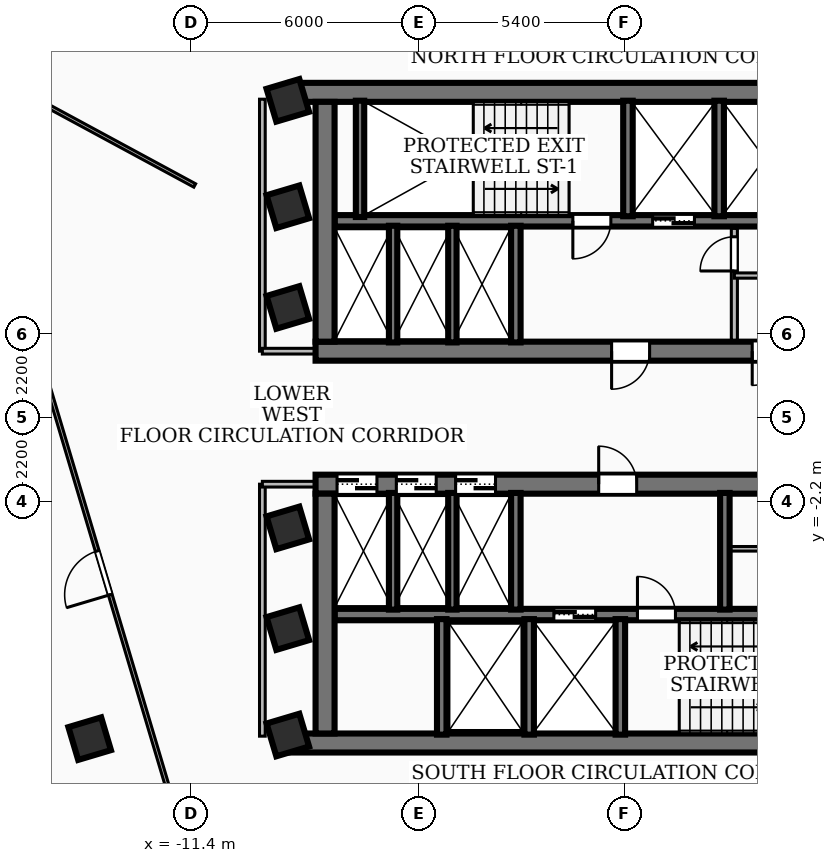
"""IFC4 building model, lengths in metres.
Left out: names, types, materials, properties, quantities, classifications, styles, units other than length and angle.
Written with IfcOpenShell. Run it as: python <this file> out.ifc"""

import sys

from ifc_helpers import new_model, si_unit, direction, frame, frame_2d, origin, origin_2d, place, context, subcontext, project, spatial, rectangle, extrude, element, fill, save


model = new_model("IFC4")
c1 = context("Model", 3, precision=1e-05, world=origin(), true_north=direction((0.0, 1.0)))
c2 = subcontext(c1, "Body", "Model", "MODEL_VIEW")
j1 = project(units=[si_unit("LENGTHUNIT", "METRE"), si_unit("PLANEANGLEUNIT", "RADIAN")], contexts=[c1])
p1 = place(None, origin())
s1 = spatial("IfcSite", under=j1, at=p1, CompositionType="ELEMENT")
p2 = place(p1, origin())
s2 = spatial("IfcBuilding", under=s1, at=p2, CompositionType="ELEMENT")
p3 = place(p2, frame((0.0, 0.0, 141.48)))
s3 = spatial("IfcBuildingStorey", under=s2, at=p3, CompositionType="ELEMENT", Elevation=141.48)
p4 = place(p3, frame((-8.78, 8.56, 0.0), z_axis=(0.0, 0.0, 1.0), x_axis=(1.0, 0.0, 0.0)))
e1 = element("IfcWall", 1, at=p4, inside=s3, PredefinedType="SHEAR", context=c2, shape_type="SweptSolid", body=[
    extrude(rectangle(XDim=17.56, YDim=0.5, at=frame_2d((8.78, 0.0))), origin(), (0.0, 0.0, 1.0), 3.32),
])
p5 = place(p3, frame((8.12, 1.75, 0.0), z_axis=(0.0, 0.0, 1.0), x_axis=(-1.0, 0.0, 0.0)))
e2 = element("IfcWall", 2, at=p5, inside=s3, PredefinedType="SHEAR", context=c2, shape_type="SweptSolid", body=[
    extrude(rectangle(XDim=16.24, YDim=0.5, at=frame_2d((8.12, 0.0))), origin(), (0.0, 0.0, 1.0), 3.32),
])
p6 = place(p5, frame((7.45, 0.0, 0.0)))
e3 = element("IfcOpeningElement", 3, at=p6, cuts=e2, PredefinedType="OPENING", context=c2, shape_type="SweptSolid", body=[
    extrude(rectangle(XDim=1.0, YDim=2.1, at=frame_2d((0.5, 1.05))), frame((0.0, 0.26, 0.0), z_axis=(0.0, -1.0, 0.0), x_axis=(1.0, 0.0, 0.0)), (0.0, 0.0, 1.0), 0.52),
])
p7 = place(p5, frame((3.85, 0.0, 0.0)))
e4 = element("IfcOpeningElement", 4, at=p7, cuts=e2, PredefinedType="OPENING", context=c2, shape_type="SweptSolid", body=[
    extrude(rectangle(XDim=0.9, YDim=2.06, at=frame_2d((0.45, 1.03))), frame((0.0, 0.26, 0.0), z_axis=(0.0, -1.0, 0.0), x_axis=(1.0, 0.0, 0.0)), (0.0, 0.0, 1.0), 0.52),
])
p8 = place(p5, frame((2.35, 0.0, 0.0)))
e5 = element("IfcOpeningElement", 5, at=p8, cuts=e2, PredefinedType="OPENING", context=c2, shape_type="SweptSolid", body=[
    extrude(rectangle(XDim=0.9, YDim=2.06, at=frame_2d((0.45, 1.03))), frame((0.0, 0.26, 0.0), z_axis=(0.0, -1.0, 0.0), x_axis=(1.0, 0.0, 0.0)), (0.0, 0.0, 1.0), 0.52),
])
p9 = place(p5, frame((0.8, 0.0, 0.0)))
e6 = element("IfcOpeningElement", 6, at=p9, cuts=e2, PredefinedType="OPENING", context=c2, shape_type="SweptSolid", body=[
    extrude(rectangle(XDim=0.9, YDim=2.06, at=frame_2d((0.45, 1.03))), frame((0.0, 0.26, 0.0), z_axis=(0.0, -1.0, 0.0), x_axis=(1.0, 0.0, 0.0)), (0.0, 0.0, 1.0), 0.52),
])
p10 = place(p3, frame((-7.87, 2.0, 0.0), z_axis=(0.0, 0.0, 1.0), x_axis=(0.0, 1.0, 0.0)))
e7 = element("IfcWall", 7, at=p10, inside=s3, PredefinedType="SHEAR", context=c2, shape_type="SweptSolid", body=[
    extrude(rectangle(XDim=6.31, YDim=0.5, at=frame_2d((3.155, 0.0))), origin(), (0.0, 0.0, 1.0), 3.32),
])
p11 = place(p3, frame((7.62, 5.18, 0.0), z_axis=(0.0, 0.0, 1.0), x_axis=(-1.0, 0.0, 0.0)))
e8 = element("IfcWall", 8, at=p11, inside=s3, PredefinedType="SOLIDWALL", context=c2, shape_type="SweptSolid", body=[
    extrude(rectangle(XDim=15.24, YDim=0.3, at=frame_2d((7.62, 0.0))), origin(), (0.0, 0.0, 1.0), 3.32),
])
p12 = place(p11, frame((5.77, 0.0, 0.0)))
e9 = element("IfcOpeningElement", 9, at=p12, cuts=e8, PredefinedType="OPENING", context=c2, shape_type="SweptSolid", body=[
    extrude(rectangle(XDim=1.1, YDim=2.15, at=frame_2d((0.55, 1.075))), frame((0.0, 0.16, 0.0), z_axis=(0.0, -1.0, 0.0), x_axis=(1.0, 0.0, 0.0)), (0.0, 0.0, 1.0), 0.32),
])
p13 = place(p11, frame((2.97, 0.0, 0.0)))
e10 = element("IfcOpeningElement", 10, at=p13, cuts=e8, PredefinedType="OPENING", context=c2, shape_type="SweptSolid", body=[
    extrude(rectangle(XDim=1.1, YDim=2.15, at=frame_2d((0.55, 1.075))), frame((0.0, 0.16, 0.0), z_axis=(0.0, -1.0, 0.0), x_axis=(1.0, 0.0, 0.0)), (0.0, 0.0, 1.0), 0.32),
])
p14 = place(p11, frame((7.97, 0.0, 0.0)))
e11 = element("IfcOpeningElement", 11, at=p14, cuts=e8, PredefinedType="OPENING", context=c2, shape_type="SweptSolid", body=[
    extrude(rectangle(XDim=1.0, YDim=2.1, at=frame_2d((0.5, 1.05))), frame((0.0, 0.16, 0.0), z_axis=(0.0, -1.0, 0.0), x_axis=(1.0, 0.0, 0.0)), (0.0, 0.0, 1.0), 0.32),
])
p15 = place(p3, frame((8.78, -8.56, 0.0), z_axis=(0.0, 0.0, 1.0), x_axis=(-1.0, 0.0, 0.0)))
e12 = element("IfcWall", 12, at=p15, inside=s3, PredefinedType="SHEAR", context=c2, shape_type="SweptSolid", body=[
    extrude(rectangle(XDim=17.56, YDim=0.5, at=frame_2d((8.78, 0.0))), origin(), (0.0, 0.0, 1.0), 3.32),
])
p16 = place(p3, frame((-8.12, -1.75, 0.0), z_axis=(0.0, 0.0, 1.0), x_axis=(1.0, 0.0, 0.0)))
e13 = element("IfcWall", 13, at=p16, inside=s3, PredefinedType="SHEAR", context=c2, shape_type="SweptSolid", body=[
    extrude(rectangle(XDim=16.24, YDim=0.5, at=frame_2d((8.12, 0.0))), origin(), (0.0, 0.0, 1.0), 3.32),
])
p17 = place(p16, frame((7.45, 0.0, 0.0)))
e14 = element("IfcOpeningElement", 14, at=p17, cuts=e13, PredefinedType="OPENING", context=c2, shape_type="SweptSolid", body=[
    extrude(rectangle(XDim=1.0, YDim=2.1, at=frame_2d((0.5, 1.05))), frame((0.0, 0.26, 0.0), z_axis=(0.0, -1.0, 0.0), x_axis=(1.0, 0.0, 0.0)), (0.0, 0.0, 1.0), 0.52),
])
p18 = place(p16, frame((12.65, 0.0, 0.0)))
e15 = element("IfcOpeningElement", 15, at=p18, cuts=e13, PredefinedType="OPENING", context=c2, shape_type="SweptSolid", body=[
    extrude(rectangle(XDim=0.9, YDim=2.06, at=frame_2d((0.45, 1.03))), frame((0.0, 0.26, 0.0), z_axis=(0.0, -1.0, 0.0), x_axis=(1.0, 0.0, 0.0)), (0.0, 0.0, 1.0), 0.52),
])
p19 = place(p16, frame((0.565, 0.0, 0.0)))
e16 = element("IfcOpeningElement", 16, at=p19, cuts=e13, PredefinedType="OPENING", context=c2, shape_type="SweptSolid", body=[
    extrude(rectangle(XDim=1.05, YDim=2.15, at=frame_2d((0.525, 1.075))), frame((0.0, 0.26, 0.0), z_axis=(0.0, -1.0, 0.0), x_axis=(1.0, 0.0, 0.0)), (0.0, 0.0, 1.0), 0.52),
])
p20 = place(p16, frame((2.125, 0.0, 0.0)))
e17 = element("IfcOpeningElement", 17, at=p20, cuts=e13, PredefinedType="OPENING", context=c2, shape_type="SweptSolid", body=[
    extrude(rectangle(XDim=1.05, YDim=2.15, at=frame_2d((0.525, 1.075))), frame((0.0, 0.26, 0.0), z_axis=(0.0, -1.0, 0.0), x_axis=(1.0, 0.0, 0.0)), (0.0, 0.0, 1.0), 0.52),
])
p21 = place(p16, frame((3.685, 0.0, 0.0)))
e18 = element("IfcOpeningElement", 18, at=p21, cuts=e13, PredefinedType="OPENING", context=c2, shape_type="SweptSolid", body=[
    extrude(rectangle(XDim=1.05, YDim=2.15, at=frame_2d((0.525, 1.075))), frame((0.0, 0.26, 0.0), z_axis=(0.0, -1.0, 0.0), x_axis=(1.0, 0.0, 0.0)), (0.0, 0.0, 1.0), 0.52),
])
p22 = place(p3, frame((-7.87, -8.31, 0.0), z_axis=(0.0, 0.0, 1.0), x_axis=(0.0, 1.0, 0.0)))
e19 = element("IfcWall", 19, at=p22, inside=s3, PredefinedType="SHEAR", context=c2, shape_type="SweptSolid", body=[
    extrude(rectangle(XDim=6.31, YDim=0.5, at=frame_2d((3.155, 0.0))), origin(), (0.0, 0.0, 1.0), 3.32),
])
p23 = place(p3, frame((-7.62, -5.18, 0.0), z_axis=(0.0, 0.0, 1.0), x_axis=(1.0, 0.0, 0.0)))
e20 = element("IfcWall", 20, at=p23, inside=s3, PredefinedType="SOLIDWALL", context=c2, shape_type="SweptSolid", body=[
    extrude(rectangle(XDim=15.24, YDim=0.3, at=frame_2d((7.62, 0.0))), origin(), (0.0, 0.0, 1.0), 3.32),
])
p24 = place(p23, frame((5.77, 0.0, 0.0)))
e21 = element("IfcOpeningElement", 21, at=p24, cuts=e20, PredefinedType="OPENING", context=c2, shape_type="SweptSolid", body=[
    extrude(rectangle(XDim=1.1, YDim=2.15, at=frame_2d((0.55, 1.075))), frame((0.0, 0.16, 0.0), z_axis=(0.0, -1.0, 0.0), x_axis=(1.0, 0.0, 0.0)), (0.0, 0.0, 1.0), 0.32),
])
p25 = place(p23, frame((7.97, 0.0, 0.0)))
e22 = element("IfcOpeningElement", 22, at=p25, cuts=e20, PredefinedType="OPENING", context=c2, shape_type="SweptSolid", body=[
    extrude(rectangle(XDim=1.0, YDim=2.1, at=frame_2d((0.5, 1.05))), frame((0.0, 0.16, 0.0), z_axis=(0.0, -1.0, 0.0), x_axis=(1.0, 0.0, 0.0)), (0.0, 0.0, 1.0), 0.32),
])
p26 = place(p3, frame((-6.95, 5.28, 0.0), z_axis=(0.0, 0.0, 1.0), x_axis=(0.0, 1.0, 0.0)))
e23 = element("IfcWall", 23, at=p26, inside=s3, PredefinedType="SOLIDWALL", context=c2, shape_type="SweptSolid", body=[
    extrude(rectangle(XDim=3.06, YDim=0.22, at=frame_2d((1.53, 0.0))), origin(), (0.0, 0.0, 1.0), 3.32),
])
for number, where, z_axis, x_axis in (
    (24, (0.1, 5.3, 0.0), (0.0, 0.0, 1.0), (0.0, 1.0, 0.0)),
    (25, (2.5, 5.3, 0.0), (0.0, 0.0, 1.0), (0.0, 1.0, 0.0)),
):
    element("IfcWall", number, at=place(p3, frame(where, z_axis=z_axis, x_axis=x_axis)), inside=s3, PredefinedType="SOLIDWALL", context=c2, shape_type="SweptSolid", body=[
        extrude(rectangle(XDim=3.04, YDim=0.25, at=frame_2d((1.52, 0.0))), origin(), (0.0, 0.0, 1.0), 3.32),
    ])
p27 = place(p3, frame((-2.85, 1.98, 0.0), z_axis=(0.0, 0.0, 1.0), x_axis=(0.0, 1.0, 0.0)))
e26 = element("IfcWall", 26, at=p27, inside=s3, PredefinedType="SOLIDWALL", context=c2, shape_type="SweptSolid", body=[
    extrude(rectangle(XDim=3.07, YDim=0.25, at=frame_2d((1.535, 0.0))), origin(), (0.0, 0.0, 1.0), 3.32),
])
for number, where, z_axis, x_axis in (
    (27, (-0.1, -8.34, 0.0), (0.0, 0.0, 1.0), (0.0, 1.0, 0.0)),
    (28, (-2.5, -8.34, 0.0), (0.0, 0.0, 1.0), (0.0, 1.0, 0.0)),
    (29, (-4.8, -8.34, 0.0), (0.0, 0.0, 1.0), (0.0, 1.0, 0.0)),
):
    element("IfcWall", number, at=place(p3, frame(where, z_axis=z_axis, x_axis=x_axis)), inside=s3, PredefinedType="SOLIDWALL", context=c2, shape_type="SweptSolid", body=[
        extrude(rectangle(XDim=3.04, YDim=0.25, at=frame_2d((1.52, 0.0))), origin(), (0.0, 0.0, 1.0), 3.32),
    ])
for number, where, z_axis, x_axis in (
    (30, (-2.85, -5.05, 0.0), (0.0, 0.0, 1.0), (0.0, 1.0, 0.0)),
    (31, (2.65, -5.05, 0.0), (0.0, 0.0, 1.0), (0.0, 1.0, 0.0)),
):
    element("IfcWall", number, at=place(p3, frame(where, z_axis=z_axis, x_axis=x_axis)), inside=s3, PredefinedType="SOLIDWALL", context=c2, shape_type="SweptSolid", body=[
        extrude(rectangle(XDim=3.07, YDim=0.25, at=frame_2d((1.535, 0.0))), origin(), (0.0, 0.0, 1.0), 3.32),
    ])
for number, where, z_axis, x_axis in (
    (32, (-6.08, 1.98, 0.0), (0.0, 0.0, 1.0), (0.0, 1.0, 0.0)),
    (33, (-4.52, 1.98, 0.0), (0.0, 0.0, 1.0), (0.0, 1.0, 0.0)),
    (34, (-6.08, -5.05, 0.0), (0.0, 0.0, 1.0), (0.0, 1.0, 0.0)),
    (35, (-4.52, -5.05, 0.0), (0.0, 0.0, 1.0), (0.0, 1.0, 0.0)),
):
    element("IfcWall", number, at=place(p3, frame(where, z_axis=z_axis, x_axis=x_axis)), inside=s3, PredefinedType="SOLIDWALL", context=c2, shape_type="SweptSolid", body=[
        extrude(rectangle(XDim=3.07, YDim=0.22, at=frame_2d((1.535, 0.0))), origin(), (0.0, 0.0, 1.0), 3.32),
    ])
for number, where, z_axis, x_axis in (
    (36, (-8.85, -5.55, 0.0), (0.0, 0.0, 1.0), (0.958, 0.286, 0.0)),
    (37, (-8.85, -2.9, 0.0), (0.0, 0.0, 1.0), (0.958, 0.286, 0.0)),
    (38, (-8.85, 2.9, 0.0), (0.0, 0.0, 1.0), (0.958, 0.286, 0.0)),
    (39, (-8.85, 5.55, 0.0), (0.0, 0.0, 1.0), (0.958, 0.286, 0.0)),
    (40, (-8.85, 8.35, 0.0), (0.0, 0.0, 1.0), (0.958, 0.286, 0.0)),
    (41, (-8.85, -8.35, 0.0), (0.0, 0.0, 1.0), (0.958, 0.286, 0.0)),
    (42, (-14.064, -8.445, 0.0), (0.0, 0.0, 1.0), (0.958, 0.286, 0.0)),
):
    element("IfcColumn", number, at=place(p3, frame(where, z_axis=z_axis, x_axis=x_axis)), inside=s3, PredefinedType="COLUMN", context=c2, shape_type="SweptSolid", body=[
        extrude(rectangle(XDim=0.9, YDim=0.9, at=origin_2d()), origin(), (0.0, 0.0, 1.0), 3.6),
    ])
p28 = place(p3, frame((2.9, 2.04, 0.0), z_axis=(0.0, 0.0, 1.0), x_axis=(0.0, 1.0, 0.0)))
e43 = element("IfcWall", 43, at=p28, inside=s3, PredefinedType="PARTITIONING", context=c2, shape_type="SweptSolid", body=[
    extrude(rectangle(XDim=2.94, YDim=0.16, at=frame_2d((1.47, 0.0))), origin(), (0.0, 0.0, 1.0), 2.55),
])
p29 = place(p28, frame((1.82, 0.0, 0.0)))
e44 = element("IfcOpeningElement", 44, at=p29, cuts=e43, PredefinedType="OPENING", context=c2, shape_type="SweptSolid", body=[
    extrude(rectangle(XDim=0.9, YDim=2.06, at=frame_2d((0.45, 1.03))), frame((0.0, 0.09, 0.0), z_axis=(0.0, -1.0, 0.0), x_axis=(1.0, 0.0, 0.0)), (0.0, 0.0, 1.0), 0.18),
])
p30 = place(p3, frame((2.9, 3.74, 0.0), z_axis=(0.0, 0.0, 1.0), x_axis=(1.0, 0.0, 0.0)))
e45 = element("IfcWall", 45, at=p30, inside=s3, PredefinedType="PARTITIONING", context=c2, shape_type="SweptSolid", body=[
    extrude(rectangle(XDim=4.65, YDim=0.138, at=frame_2d((2.325, 0.0))), origin(), (0.0, 0.0, 1.0), 3.32),
])
p31 = place(p3, frame((2.8, -3.45, 0.0), z_axis=(0.0, 0.0, 1.0), x_axis=(1.0, 0.0, 0.0)))
e46 = element("IfcWall", 46, at=p31, inside=s3, PredefinedType="PARTITIONING", context=c2, shape_type="SweptSolid", body=[
    extrude(rectangle(XDim=4.68, YDim=0.12, at=frame_2d((2.34, 0.0))), origin(), (0.0, 0.0, 1.0), 3.32),
])
p32 = place(p31, frame((1.9, 0.0, 0.0)))
e47 = element("IfcOpeningElement", 47, at=p32, cuts=e46, PredefinedType="OPENING", context=c2, shape_type="SweptSolid", body=[
    extrude(rectangle(XDim=0.86, YDim=2.04, at=frame_2d((0.43, 1.02))), frame((0.0, 0.07, 0.0), z_axis=(0.0, -1.0, 0.0), x_axis=(1.0, 0.0, 0.0)), (0.0, 0.0, 1.0), 0.14),
])
p33 = place(p3, frame((-9.52, 1.75, 0.0), z_axis=(0.0, 0.0, 1.0), x_axis=(0.0, 1.0, 0.0)))
e48 = element("IfcWall", 48, at=p33, inside=s3, PredefinedType="PARTITIONING", context=c2, shape_type="SweptSolid", body=[
    extrude(rectangle(XDim=6.63, YDim=0.15, at=frame_2d((3.315, 0.0))), origin(), (0.0, 0.0, 1.0), 2.55),
])
p34 = place(p3, frame((-7.85, 1.75, 0.0), z_axis=(0.0, 0.0, 1.0), x_axis=(-1.0, 0.0, 0.0)))
e49 = element("IfcWall", 49, at=p34, inside=s3, PredefinedType="PARTITIONING", context=c2, shape_type="SweptSolid", body=[
    extrude(rectangle(XDim=1.67, YDim=0.15, at=frame_2d((0.835, 0.0))), origin(), (0.0, 0.0, 1.0), 2.55),
])
p35 = place(p3, frame((-9.52, -8.38, 0.0), z_axis=(0.0, 0.0, 1.0), x_axis=(0.0, 1.0, 0.0)))
e50 = element("IfcWall", 50, at=p35, inside=s3, PredefinedType="PARTITIONING", context=c2, shape_type="SweptSolid", body=[
    extrude(rectangle(XDim=6.63, YDim=0.15, at=frame_2d((3.315, 0.0))), origin(), (0.0, 0.0, 1.0), 2.55),
])
p36 = place(p3, frame((-7.85, -1.75, 0.0), z_axis=(0.0, 0.0, 1.0), x_axis=(-1.0, 0.0, 0.0)))
e51 = element("IfcWall", 51, at=p36, inside=s3, PredefinedType="PARTITIONING", context=c2, shape_type="SweptSolid", body=[
    extrude(rectangle(XDim=1.67, YDim=0.15, at=frame_2d((0.835, 0.0))), origin(), (0.0, 0.0, 1.0), 2.55),
])
p37 = place(p3, frame((-11.3, 6.11, 0.0), z_axis=(0.0, 0.0, 1.0), x_axis=(-0.879653556483, 0.475614991948, 0.0)))
e52 = element("IfcWall", 52, at=p37, inside=s3, PredefinedType="PARTITIONING", context=c2, shape_type="SweptSolid", body=[
    extrude(rectangle(XDim=6.829, YDim=0.1, at=frame_2d((3.414, 0.0))), origin(), (0.0, 0.0, 1.0), 3.32),
])
p38 = place(p3, frame((-10.655, -14.279, 0.0), z_axis=(0.0, 0.0, 1.0), x_axis=(-0.285665949025, 0.958329257389, 0.0)))
e53 = element("IfcWall", 53, at=p38, inside=s3, PredefinedType="PARTITIONING", context=c2, shape_type="SweptSolid", body=[
    extrude(rectangle(XDim=20.66, YDim=0.1, at=frame_2d((10.33, 0.0))), origin(), (0.0, 0.0, 1.0), 2.55),
])
p39 = place(p38, frame((10.04, 0.0, 0.0)))
e54 = element("IfcOpeningElement", 54, at=p39, cuts=e53, PredefinedType="OPENING", context=c2, shape_type="SweptSolid", body=[
    extrude(rectangle(XDim=1.2, YDim=2.1, at=frame_2d((0.6, 1.05))), frame((0.0, 0.06, 0.0), z_axis=(0.0, -1.0, 0.0), x_axis=(1.0, 0.0, 0.0)), (0.0, 0.0, 1.0), 0.12),
])
p40 = place(p6, origin())
e55 = element("IfcDoor", 55, at=p40, inside=s3, OperationType="SINGLE_SWING_RIGHT", PredefinedType="DOOR", context=c2, shape_type="SweptSolid", body=[
    extrude(rectangle(XDim=1.0, YDim=2.1, at=frame_2d((0.5, 1.05))), frame((0.0, 0.025, 0.0), z_axis=(0.0, -1.0, 0.0), x_axis=(1.0, 0.0, 0.0)), (0.0, 0.0, 1.0), 0.05),
])
fill(e3, e55)
p41 = place(p17, origin())
e56 = element("IfcDoor", 56, at=p41, inside=s3, OperationType="SINGLE_SWING_LEFT", PredefinedType="DOOR", context=c2, shape_type="SweptSolid", body=[
    extrude(rectangle(XDim=1.0, YDim=2.1, at=frame_2d((0.5, 1.05))), frame((0.0, 0.025, 0.0), z_axis=(0.0, -1.0, 0.0), x_axis=(1.0, 0.0, 0.0)), (0.0, 0.0, 1.0), 0.05),
])
fill(e14, e56)
p42 = place(p12, origin())
e57 = element("IfcDoor", 57, at=p42, inside=s3, OperationType="DOUBLE_DOOR_SLIDING", PredefinedType="DOOR", context=c2, shape_type="SweptSolid", body=[
    extrude(rectangle(XDim=1.1, YDim=2.15, at=frame_2d((0.55, 1.075))), frame((0.0, 0.025, 0.0), z_axis=(0.0, -1.0, 0.0), x_axis=(1.0, 0.0, 0.0)), (0.0, 0.0, 1.0), 0.05),
])
fill(e9, e57)
p43 = place(p14, origin())
e58 = element("IfcDoor", 58, at=p43, inside=s3, OperationType="SINGLE_SWING_RIGHT", PredefinedType="DOOR", context=c2, shape_type="SweptSolid", body=[
    extrude(rectangle(XDim=1.0, YDim=2.1, at=frame_2d((0.5, 1.05))), frame((0.0, 0.025, 0.0), z_axis=(0.0, -1.0, 0.0), x_axis=(1.0, 0.0, 0.0)), (0.0, 0.0, 1.0), 0.05),
])
fill(e11, e58)
p44 = place(p24, origin())
e59 = element("IfcDoor", 59, at=p44, inside=s3, OperationType="DOUBLE_DOOR_SLIDING", PredefinedType="DOOR", context=c2, shape_type="SweptSolid", body=[
    extrude(rectangle(XDim=1.1, YDim=2.15, at=frame_2d((0.55, 1.075))), frame((0.0, 0.025, 0.0), z_axis=(0.0, -1.0, 0.0), x_axis=(1.0, 0.0, 0.0)), (0.0, 0.0, 1.0), 0.05),
])
fill(e21, e59)
p45 = place(p25, origin())
e60 = element("IfcDoor", 60, at=p45, inside=s3, OperationType="SINGLE_SWING_LEFT", PredefinedType="DOOR", context=c2, shape_type="SweptSolid", body=[
    extrude(rectangle(XDim=1.0, YDim=2.1, at=frame_2d((0.5, 1.05))), frame((0.0, 0.025, 0.0), z_axis=(0.0, -1.0, 0.0), x_axis=(1.0, 0.0, 0.0)), (0.0, 0.0, 1.0), 0.05),
])
fill(e22, e60)
p46 = place(p19, origin())
e61 = element("IfcDoor", 61, at=p46, inside=s3, OperationType="DOUBLE_DOOR_SLIDING", PredefinedType="DOOR", context=c2, shape_type="SweptSolid", body=[
    extrude(rectangle(XDim=1.05, YDim=2.15, at=frame_2d((0.525, 1.075))), frame((0.0, 0.025, 0.0), z_axis=(0.0, -1.0, 0.0), x_axis=(1.0, 0.0, 0.0)), (0.0, 0.0, 1.0), 0.05),
])
fill(e16, e61)
p47 = place(p20, origin())
e62 = element("IfcDoor", 62, at=p47, inside=s3, OperationType="DOUBLE_DOOR_SLIDING", PredefinedType="DOOR", context=c2, shape_type="SweptSolid", body=[
    extrude(rectangle(XDim=1.05, YDim=2.15, at=frame_2d((0.525, 1.075))), frame((0.0, 0.025, 0.0), z_axis=(0.0, -1.0, 0.0), x_axis=(1.0, 0.0, 0.0)), (0.0, 0.0, 1.0), 0.05),
])
fill(e17, e62)
p48 = place(p21, origin())
e63 = element("IfcDoor", 63, at=p48, inside=s3, OperationType="DOUBLE_DOOR_SLIDING", PredefinedType="DOOR", context=c2, shape_type="SweptSolid", body=[
    extrude(rectangle(XDim=1.05, YDim=2.15, at=frame_2d((0.525, 1.075))), frame((0.0, 0.025, 0.0), z_axis=(0.0, -1.0, 0.0), x_axis=(1.0, 0.0, 0.0)), (0.0, 0.0, 1.0), 0.05),
])
fill(e18, e63)
p49 = place(p7, origin())
e64 = element("IfcDoor", 64, at=p49, inside=s3, OperationType="SINGLE_SWING_RIGHT", PredefinedType="DOOR", context=c2, shape_type="SweptSolid", body=[
    extrude(rectangle(XDim=0.9, YDim=2.06, at=frame_2d((0.45, 1.03))), frame((0.0, 0.025, 0.0), z_axis=(0.0, -1.0, 0.0), x_axis=(1.0, 0.0, 0.0)), (0.0, 0.0, 1.0), 0.05),
])
fill(e4, e64)
p50 = place(p29, origin())
e65 = element("IfcDoor", 65, at=p50, inside=s3, OperationType="SINGLE_SWING_LEFT", PredefinedType="DOOR", context=c2, shape_type="SweptSolid", body=[
    extrude(rectangle(XDim=0.9, YDim=2.06, at=frame_2d((0.45, 1.03))), frame((0.0, 0.025, 0.0), z_axis=(0.0, -1.0, 0.0), x_axis=(1.0, 0.0, 0.0)), (0.0, 0.0, 1.0), 0.05),
])
fill(e44, e65)
p51 = place(p39, origin())
e66 = element("IfcDoor", 66, at=p51, inside=s3, OperationType="SINGLE_SWING_LEFT", PredefinedType="DOOR", context=c2, shape_type="SweptSolid", body=[
    extrude(rectangle(XDim=1.2, YDim=2.1, at=frame_2d((0.6, 1.05))), frame((0.0, 0.025, 0.0), z_axis=(0.0, -1.0, 0.0), x_axis=(1.0, 0.0, 0.0)), (0.0, 0.0, 1.0), 0.05),
])
fill(e54, e66)
save(model, sys.argv[1])
